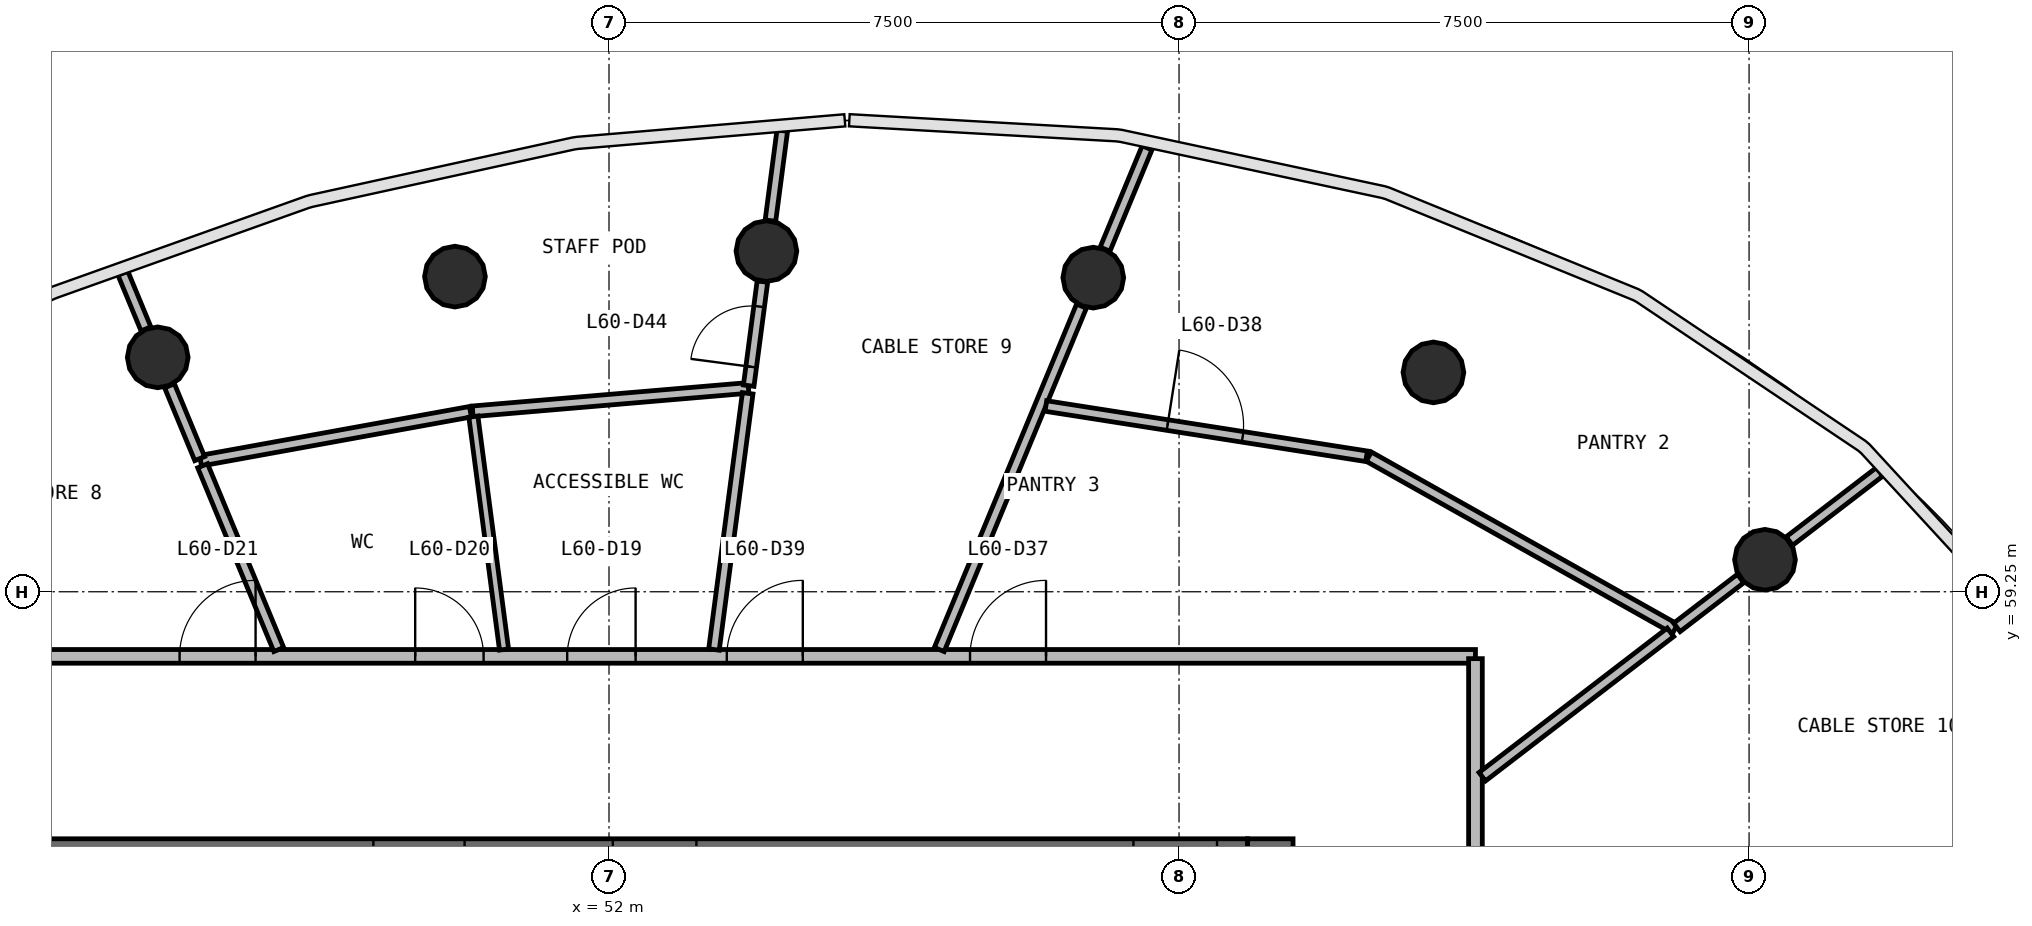
"""IFC4 building model, lengths in metres.
Left out: names, types, materials, properties, quantities, classifications, styles, units other than length and angle.
Written with IfcOpenShell. Run it as: python <this file> out.ifc"""

import sys

from ifc_helpers import new_model, si_unit, direction, frame, frame_2d, origin, origin_2d, place, context, subcontext, project, spatial, rectangle, circle, extrude, source, transform, mapped, element, fill, save


model = new_model("IFC4")
c1 = context("Model", 3, precision=1e-05, world=origin(), true_north=direction((0.0, 1.0)))
c2 = subcontext(c1, "Body", "Model", "MODEL_VIEW")
j1 = project(units=[si_unit("LENGTHUNIT", "METRE"), si_unit("PLANEANGLEUNIT", "RADIAN")], contexts=[c1])
p1 = place(None, origin())
s1 = spatial("IfcSite", under=j1, at=p1, CompositionType="ELEMENT")
p2 = place(p1, origin())
s2 = spatial("IfcBuilding", under=s1, at=p2, CompositionType="ELEMENT")
p3 = place(p2, frame((0.0, 0.0, 246.2)))
s3 = spatial("IfcBuildingStorey", under=s2, at=p3, CompositionType="ELEMENT", Elevation=246.2)
p4 = place(p3, frame((60.7, 40.0, 0.0), z_axis=(0.0, 0.0, 1.0), x_axis=(0.0, 1.0, 0.0)))
e1 = element("IfcWall", 1, at=p4, inside=s3, PredefinedType="SHEAR", context=c2, shape_type="SweptSolid", body=[
    extrude(rectangle(XDim=16.0, YDim=0.6, at=frame_2d((8.0, 0.0))), origin(), (0.0, 0.0, 1.0), 3.9),
])
p5 = place(p4, frame((7.1, 0.0, 0.0)))
e2 = element("IfcOpeningElement", 2, at=p5, cuts=e1, PredefinedType="OPENING", context=c2, shape_type="SweptSolid", body=[
    extrude(rectangle(XDim=1.8, YDim=2.1, at=frame_2d((0.9, 1.05))), frame((0.0, 0.31, 0.0), z_axis=(0.0, -1.0, 0.0), x_axis=(1.0, 0.0, 0.0)), (0.0, 0.0, 1.0), 0.62),
])
p6 = place(p3, frame((60.4, 55.7, 0.0), z_axis=(0.0, 0.0, 1.0), x_axis=(-1.0, 0.0, 0.0)))
e3 = element("IfcWall", 3, at=p6, inside=s3, PredefinedType="SHEAR", context=c2, shape_type="SweptSolid", body=[
    extrude(rectangle(XDim=16.8, YDim=0.6, at=frame_2d((8.4, 0.0))), origin(), (0.0, 0.0, 1.0), 3.9),
])
p7 = place(p6, frame((0.4, 0.0, 0.0)))
e4 = element("IfcOpeningElement", 4, at=p7, cuts=e3, PredefinedType="OPENING", context=c2, shape_type="SweptSolid", body=[
    extrude(rectangle(XDim=1.1, YDim=2.1, at=frame_2d((0.55, 1.05))), frame((0.0, 0.31, 0.0), z_axis=(0.0, -1.0, 0.0), x_axis=(1.0, 0.0, 0.0)), (0.0, 0.0, 1.0), 0.62),
])
p8 = place(p6, frame((10.3, 0.0, 0.0)))
e5 = element("IfcOpeningElement", 5, at=p8, cuts=e3, PredefinedType="OPENING", context=c2, shape_type="SweptSolid", body=[
    extrude(rectangle(XDim=1.2, YDim=2.1, at=frame_2d((0.6, 1.05))), frame((0.0, 0.31, 0.0), z_axis=(0.0, -1.0, 0.0), x_axis=(1.0, 0.0, 0.0)), (0.0, 0.0, 1.0), 0.62),
])
p9 = place(p6, frame((7.25, 0.0, 0.0)))
e6 = element("IfcOpeningElement", 6, at=p9, cuts=e3, PredefinedType="OPENING", context=c2, shape_type="SweptSolid", body=[
    extrude(rectangle(XDim=1.1, YDim=2.1, at=frame_2d((0.55, 1.05))), frame((0.0, 0.31, 0.0), z_axis=(0.0, -1.0, 0.0), x_axis=(1.0, 0.0, 0.0)), (0.0, 0.0, 1.0), 0.62),
])
m1 = source(origin(), c2, "Body", "SweptSolid", [
    extrude(circle(Radius=0.4, at=origin_2d()), origin(), (0.0, 0.0, 1.0), 3.9),
])
for number, where, z_axis, x_axis in (
    (7, (67.209, 59.671, 0.0), (0.0, 0.0, 1.0), (1.0, 0.0, 0.0)),
    (8, (62.847, 62.136, 0.0), (0.0, 0.0, 1.0), (1.0, 0.0, 0.0)),
    (9, (58.372, 63.383, 0.0), (0.0, 0.0, 1.0), (1.0, 0.0, 0.0)),
    (10, (54.071, 63.731, 0.0), (0.0, 0.0, 1.0), (1.0, 0.0, 0.0)),
    (11, (49.973, 63.396, 0.0), (0.0, 0.0, 1.0), (1.0, 0.0, 0.0)),
    (12, (46.063, 62.334, 0.0), (0.0, 0.0, 1.0), (1.0, 0.0, 0.0)),
):
    element("IfcColumn", number, at=place(p3, frame(where, z_axis=z_axis, x_axis=x_axis)), inside=s3, PredefinedType="COLUMN", context=c2, shape_type="MappedRepresentation", body=[
        mapped(m1, transform((0.0, 0.0, 0.0), scale=1.0)),
    ])
p10 = place(p3, frame((40.6, 58.4, 0.0), z_axis=(0.0, 0.0, 1.0), x_axis=(1.0, 0.0, 0.0)))
e13 = element("IfcWall", 13, at=p10, inside=s3, PredefinedType="PARTITIONING", context=c2, shape_type="SweptSolid", body=[
    extrude(rectangle(XDim=22.8, YDim=0.18, at=frame_2d((11.4, 0.0))), origin(), (0.0, 0.0, 1.0), 2.88),
])
p11 = place(p10, frame((10.85, 0.0, 0.0)))
e14 = element("IfcOpeningElement", 14, at=p11, cuts=e13, PredefinedType="OPENING", context=c2, shape_type="SweptSolid", body=[
    extrude(rectangle(XDim=0.9, YDim=2.1, at=frame_2d((0.45, 1.05))), frame((0.0, 0.1, 0.0), z_axis=(0.0, -1.0, 0.0), x_axis=(1.0, 0.0, 0.0)), (0.0, 0.0, 1.0), 0.2),
])
p12 = place(p10, frame((8.85, 0.0, 0.0)))
e15 = element("IfcOpeningElement", 15, at=p12, cuts=e13, PredefinedType="OPENING", context=c2, shape_type="SweptSolid", body=[
    extrude(rectangle(XDim=0.9, YDim=2.1, at=frame_2d((0.45, 1.05))), frame((0.0, 0.1, 0.0), z_axis=(0.0, -1.0, 0.0), x_axis=(1.0, 0.0, 0.0)), (0.0, 0.0, 1.0), 0.2),
])
p13 = place(p10, frame((5.75, 0.0, 0.0)))
e16 = element("IfcOpeningElement", 16, at=p13, cuts=e13, PredefinedType="OPENING", context=c2, shape_type="SweptSolid", body=[
    extrude(rectangle(XDim=1.0, YDim=2.1, at=frame_2d((0.5, 1.05))), frame((0.0, 0.1, 0.0), z_axis=(0.0, -1.0, 0.0), x_axis=(1.0, 0.0, 0.0)), (0.0, 0.0, 1.0), 0.2),
])
p14 = place(p10, frame((16.15, 0.0, 0.0)))
e17 = element("IfcOpeningElement", 17, at=p14, cuts=e13, PredefinedType="OPENING", context=c2, shape_type="SweptSolid", body=[
    extrude(rectangle(XDim=1.0, YDim=2.1, at=frame_2d((0.5, 1.05))), frame((0.0, 0.1, 0.0), z_axis=(0.0, -1.0, 0.0), x_axis=(1.0, 0.0, 0.0)), (0.0, 0.0, 1.0), 0.2),
])
p15 = place(p10, frame((12.95, 0.0, 0.0)))
e18 = element("IfcOpeningElement", 18, at=p15, cuts=e13, PredefinedType="OPENING", context=c2, shape_type="SweptSolid", body=[
    extrude(rectangle(XDim=1.0, YDim=2.1, at=frame_2d((0.5, 1.05))), frame((0.0, 0.1, 0.0), z_axis=(0.0, -1.0, 0.0), x_axis=(1.0, 0.0, 0.0)), (0.0, 0.0, 1.0), 0.2),
])
p16 = place(p3, frame((63.4, 58.37, 0.0), z_axis=(0.0, 0.0, 1.0), x_axis=(0.0, -1.0, 0.0)))
e19 = element("IfcWall", 19, at=p16, inside=s3, PredefinedType="PARTITIONING", context=c2, shape_type="SweptSolid", body=[
    extrude(rectangle(XDim=20.74, YDim=0.18, at=frame_2d((10.37, 0.0))), origin(), (0.0, 0.0, 1.0), 2.88),
])
p17 = place(p16, frame((12.09, 0.0, 0.0)))
e20 = element("IfcOpeningElement", 20, at=p17, cuts=e19, PredefinedType="OPENING", context=c2, shape_type="SweptSolid", body=[
    extrude(rectangle(XDim=1.0, YDim=2.1, at=frame_2d((0.5, 1.05))), frame((0.0, 0.1, 0.0), z_axis=(0.0, -1.0, 0.0), x_axis=(1.0, 0.0, 0.0)), (0.0, 0.0, 1.0), 0.2),
])
p18 = place(p16, frame((9.89, 0.0, 0.0)))
e21 = element("IfcOpeningElement", 21, at=p18, cuts=e19, PredefinedType="OPENING", context=c2, shape_type="SweptSolid", body=[
    extrude(rectangle(XDim=1.0, YDim=2.1, at=frame_2d((0.5, 1.05))), frame((0.0, 0.1, 0.0), z_axis=(0.0, -1.0, 0.0), x_axis=(1.0, 0.0, 0.0)), (0.0, 0.0, 1.0), 0.2),
])
p19 = place(p16, frame((4.29, 0.0, 0.0)))
e22 = element("IfcOpeningElement", 22, at=p19, cuts=e19, PredefinedType="OPENING", context=c2, shape_type="SweptSolid", body=[
    extrude(rectangle(XDim=1.0, YDim=2.1, at=frame_2d((0.5, 1.05))), frame((0.0, 0.1, 0.0), z_axis=(0.0, -1.0, 0.0), x_axis=(1.0, 0.0, 0.0)), (0.0, 0.0, 1.0), 0.2),
])
p20 = place(p3, frame((56.345, 58.49, 0.0), z_axis=(0.0, 0.0, 1.0), x_axis=(0.382689806821, 0.923876892099, 0.0)))
e23 = element("IfcWall", 23, at=p20, inside=s3, PredefinedType="PARTITIONING", context=c2, shape_type="SweptSolid", body=[
    extrude(rectangle(XDim=4.891, YDim=0.14, at=frame_2d((2.445, 0.0))), origin(), (0.0, 0.0, 1.0), 2.88),
])
p21 = place(p3, frame((66.026, 58.763, 0.0), z_axis=(0.0, 0.0, 1.0), x_axis=(-0.871725001743, 0.489995429914, 0.0)))
e24 = element("IfcWall", 24, at=p21, inside=s3, PredefinedType="PARTITIONING", context=c2, shape_type="SweptSolid", body=[
    extrude(rectangle(XDim=4.623, YDim=0.14, at=frame_2d((2.312, 0.0))), origin(), (0.0, 0.0, 1.0), 2.88),
])
p22 = place(p3, frame((57.748, 61.694, 0.0), z_axis=(0.0, 0.0, 1.0), x_axis=(0.987944910752, -0.154805856864, 0.0)))
e25 = element("IfcWall", 25, at=p22, inside=s3, PredefinedType="PARTITIONING", context=c2, shape_type="SweptSolid", body=[
    extrude(rectangle(XDim=4.271, YDim=0.14, at=frame_2d((2.135, 0.0))), origin(), (0.0, 0.0, 1.0), 2.88),
])
p23 = place(p22, frame((1.621, 0.0, 0.0)))
e26 = element("IfcOpeningElement", 26, at=p23, cuts=e25, PredefinedType="OPENING", context=c2, shape_type="SweptSolid", body=[
    extrude(rectangle(XDim=1.0, YDim=2.1, at=frame_2d((0.5, 1.05))), frame((0.0, 0.08, 0.0), z_axis=(0.0, -1.0, 0.0), x_axis=(1.0, 0.0, 0.0)), (0.0, 0.0, 1.0), 0.16),
])
p24 = place(p3, frame((53.834, 61.932, 0.0), z_axis=(0.0, 0.0, 1.0), x_axis=(-0.996413179943, -0.084621361581, 0.0)))
e27 = element("IfcWall", 27, at=p24, inside=s3, PredefinedType="PARTITIONING", context=c2, shape_type="SweptSolid", body=[
    extrude(rectangle(XDim=3.641, YDim=0.14, at=frame_2d((1.82, 0.0))), origin(), (0.0, 0.0, 1.0), 2.88),
])
p25 = place(p3, frame((50.177, 61.618, 0.0), z_axis=(0.0, 0.0, 1.0), x_axis=(-0.983923982587, -0.178587783708, 0.0)))
e28 = element("IfcWall", 28, at=p25, inside=s3, PredefinedType="PARTITIONING", context=c2, shape_type="SweptSolid", body=[
    extrude(rectangle(XDim=3.609, YDim=0.14, at=frame_2d((1.805, 0.0))), origin(), (0.0, 0.0, 1.0), 2.88),
])
p26 = place(p3, frame((53.381, 58.49, 0.0), z_axis=(0.0, 0.0, 1.0), x_axis=(0.130474945287, 0.991451606813, 0.0)))
e29 = element("IfcWall", 29, at=p26, inside=s3, PredefinedType="PARTITIONING", context=c2, shape_type="SweptSolid", body=[
    extrude(rectangle(XDim=3.4, YDim=0.14, at=frame_2d((1.7, 0.0))), origin(), (0.0, 0.0, 1.0), 2.88),
])
p27 = place(p3, frame((63.49, 56.817, 0.0), z_axis=(0.0, 0.0, 1.0), x_axis=(0.793370833445, 0.608738630809, 0.0)))
e30 = element("IfcWall", 30, at=p27, inside=s3, PredefinedType="PARTITIONING", context=c2, shape_type="SweptSolid", body=[
    extrude(rectangle(XDim=3.121, YDim=0.14, at=frame_2d((1.56, 0.0))), origin(), (0.0, 0.0, 1.0), 2.88),
])
p28 = place(p3, frame((47.655, 58.49, 0.0), z_axis=(0.0, 0.0, 1.0), x_axis=(-0.382686863779, 0.923878111166, 0.0)))
e31 = element("IfcWall", 31, at=p28, inside=s3, PredefinedType="PARTITIONING", context=c2, shape_type="SweptSolid", body=[
    extrude(rectangle(XDim=2.617, YDim=0.14, at=frame_2d((1.309, 0.0))), origin(), (0.0, 0.0, 1.0), 2.88),
])
p29 = place(p3, frame((67.531, 59.917, 0.0), z_axis=(0.0, 0.0, 1.0), x_axis=(0.793327668176, 0.6087948841, 0.0)))
e32 = element("IfcWall", 32, at=p29, inside=s3, PredefinedType="PARTITIONING", context=c2, shape_type="SweptSolid", body=[
    extrude(rectangle(XDim=1.495, YDim=0.14, at=frame_2d((0.748, 0.0))), origin(), (0.0, 0.0, 1.0), 2.88),
])
p30 = place(p3, frame((58.527, 63.757, 0.0), z_axis=(0.0, 0.0, 1.0), x_axis=(0.382765075607, 0.923845710547, 0.0)))
e33 = element("IfcWall", 33, at=p30, inside=s3, PredefinedType="PARTITIONING", context=c2, shape_type="SweptSolid", body=[
    extrude(rectangle(XDim=1.443, YDim=0.14, at=frame_2d((0.722, 0.0))), origin(), (0.0, 0.0, 1.0), 2.88),
])
p31 = place(p3, frame((53.838, 61.962, 0.0), z_axis=(0.0, 0.0, 1.0), x_axis=(0.130541449635, 0.991442852578, 0.0)))
e34 = element("IfcWall", 34, at=p31, inside=s3, PredefinedType="PARTITIONING", context=c2, shape_type="SweptSolid", body=[
    extrude(rectangle(XDim=1.38, YDim=0.14, at=frame_2d((0.69, 0.0))), origin(), (0.0, 0.0, 1.0), 2.88),
])
p32 = place(p31, frame((0.25, 0.0, 0.0)))
e35 = element("IfcOpeningElement", 35, at=p32, cuts=e34, PredefinedType="OPENING", context=c2, shape_type="SweptSolid", body=[
    extrude(rectangle(XDim=0.8, YDim=2.1, at=frame_2d((0.4, 1.05))), frame((0.0, 0.08, 0.0), z_axis=(0.0, -1.0, 0.0), x_axis=(1.0, 0.0, 0.0)), (0.0, 0.0, 1.0), 0.16),
])
p33 = place(p3, frame((54.124, 64.132, 0.0), z_axis=(0.0, 0.0, 1.0), x_axis=(0.130570798277, 0.991438987854, 0.0)))
e36 = element("IfcWall", 36, at=p33, inside=s3, PredefinedType="PARTITIONING", context=c2, shape_type="SweptSolid", body=[
    extrude(rectangle(XDim=1.195, YDim=0.14, at=frame_2d((0.597, 0.0))), origin(), (0.0, 0.0, 1.0), 2.88),
])
p34 = place(p3, frame((66.05, 58.781, 0.0), z_axis=(0.0, 0.0, 1.0), x_axis=(0.793353438114, 0.608761301523, 0.0)))
e37 = element("IfcWall", 37, at=p34, inside=s3, PredefinedType="PARTITIONING", context=c2, shape_type="SweptSolid", body=[
    extrude(rectangle(XDim=1.057, YDim=0.14, at=frame_2d((0.528, 0.0))), origin(), (0.0, 0.0, 1.0), 2.88),
])
p35 = place(p3, frame((46.615, 61.002, 0.0), z_axis=(0.0, 0.0, 1.0), x_axis=(-0.382608264474, 0.923910664489, 0.0)))
e38 = element("IfcWall", 38, at=p35, inside=s3, PredefinedType="PARTITIONING", context=c2, shape_type="SweptSolid", body=[
    extrude(rectangle(XDim=1.037, YDim=0.14, at=frame_2d((0.519, 0.0))), origin(), (0.0, 0.0, 1.0), 2.88),
])
p36 = place(p3, frame((45.908, 62.708, 0.0), z_axis=(0.0, 0.0, 1.0), x_axis=(-0.382669005831, 0.923885508045, 0.0)))
e39 = element("IfcWall", 39, at=p36, inside=s3, PredefinedType="PARTITIONING", context=c2, shape_type="SweptSolid", body=[
    extrude(rectangle(XDim=0.793, YDim=0.14, at=frame_2d((0.396, 0.0))), origin(), (0.0, 0.0, 1.0), 2.88),
])
p37 = place(p3, frame((50.619, 58.49, 0.0), z_axis=(0.0, 0.0, 1.0), x_axis=(-0.130487204363, 0.991449993443, 0.0)))
e40 = element("IfcWall", 40, at=p37, inside=s3, PredefinedType="PARTITIONING", context=c2, shape_type="SweptSolid", body=[
    extrude(rectangle(XDim=3.091, YDim=0.12, at=frame_2d((1.545, 0.0))), origin(), (0.0, 0.0, 1.0), 2.88),
])
m2 = source(origin(), c2, "Body", "SweptSolid", [
    extrude(rectangle(XDim=0.9, YDim=2.1, at=frame_2d((0.45, 1.05))), frame((0.0, 0.025, 0.0), z_axis=(0.0, -1.0, 0.0), x_axis=(1.0, 0.0, 0.0)), (0.0, 0.0, 1.0), 0.05),
])
p38 = place(p11, origin())
e41 = element("IfcDoor", 41, at=p38, inside=s3, OperationType="SINGLE_SWING_RIGHT", PredefinedType="DOOR", context=c2, shape_type="MappedRepresentation", body=[
    mapped(m2, transform((0.0, 0.0, 0.0), scale=1.0)),
])
fill(e14, e41)
p39 = place(p12, origin())
e42 = element("IfcDoor", 42, at=p39, inside=s3, OperationType="SINGLE_SWING_LEFT", PredefinedType="DOOR", context=c2, shape_type="MappedRepresentation", body=[
    mapped(m2, transform((0.0, 0.0, 0.0), scale=1.0)),
])
fill(e15, e42)
m3 = source(origin(), c2, "Body", "SweptSolid", [
    extrude(rectangle(XDim=1.0, YDim=2.1, at=frame_2d((0.5, 1.05))), frame((0.0, 0.025, 0.0), z_axis=(0.0, -1.0, 0.0), x_axis=(1.0, 0.0, 0.0)), (0.0, 0.0, 1.0), 0.05),
])
p40 = place(p13, origin())
e43 = element("IfcDoor", 43, at=p40, inside=s3, OperationType="SINGLE_SWING_RIGHT", PredefinedType="DOOR", context=c2, shape_type="MappedRepresentation", body=[
    mapped(m3, transform((0.0, 0.0, 0.0), scale=1.0)),
])
fill(e16, e43)
p41 = place(p14, origin())
e44 = element("IfcDoor", 44, at=p41, inside=s3, OperationType="SINGLE_SWING_RIGHT", PredefinedType="DOOR", context=c2, shape_type="MappedRepresentation", body=[
    mapped(m3, transform((0.0, 0.0, 0.0), scale=1.0)),
])
fill(e17, e44)
p42 = place(p23, origin())
e45 = element("IfcDoor", 45, at=p42, inside=s3, OperationType="SINGLE_SWING_LEFT", PredefinedType="DOOR", context=c2, shape_type="MappedRepresentation", body=[
    mapped(m3, transform((0.0, 0.0, 0.0), scale=1.0)),
])
fill(e26, e45)
p43 = place(p15, origin())
e46 = element("IfcDoor", 46, at=p43, inside=s3, OperationType="SINGLE_SWING_RIGHT", PredefinedType="DOOR", context=c2, shape_type="MappedRepresentation", body=[
    mapped(m3, transform((0.0, 0.0, 0.0), scale=1.0)),
])
fill(e18, e46)
m4 = source(origin(), c2, "Body", "SweptSolid", [
    extrude(rectangle(XDim=0.8, YDim=2.1, at=frame_2d((0.4, 1.05))), frame((0.0, 0.025, 0.0), z_axis=(0.0, -1.0, 0.0), x_axis=(1.0, 0.0, 0.0)), (0.0, 0.0, 1.0), 0.05),
])
p44 = place(p32, origin())
e47 = element("IfcDoor", 47, at=p44, inside=s3, OperationType="SINGLE_SWING_LEFT", PredefinedType="DOOR", context=c2, shape_type="MappedRepresentation", body=[
    mapped(m4, transform((0.0, 0.0, 0.0), scale=1.0)),
])
fill(e35, e47)
save(model, sys.argv[1])
